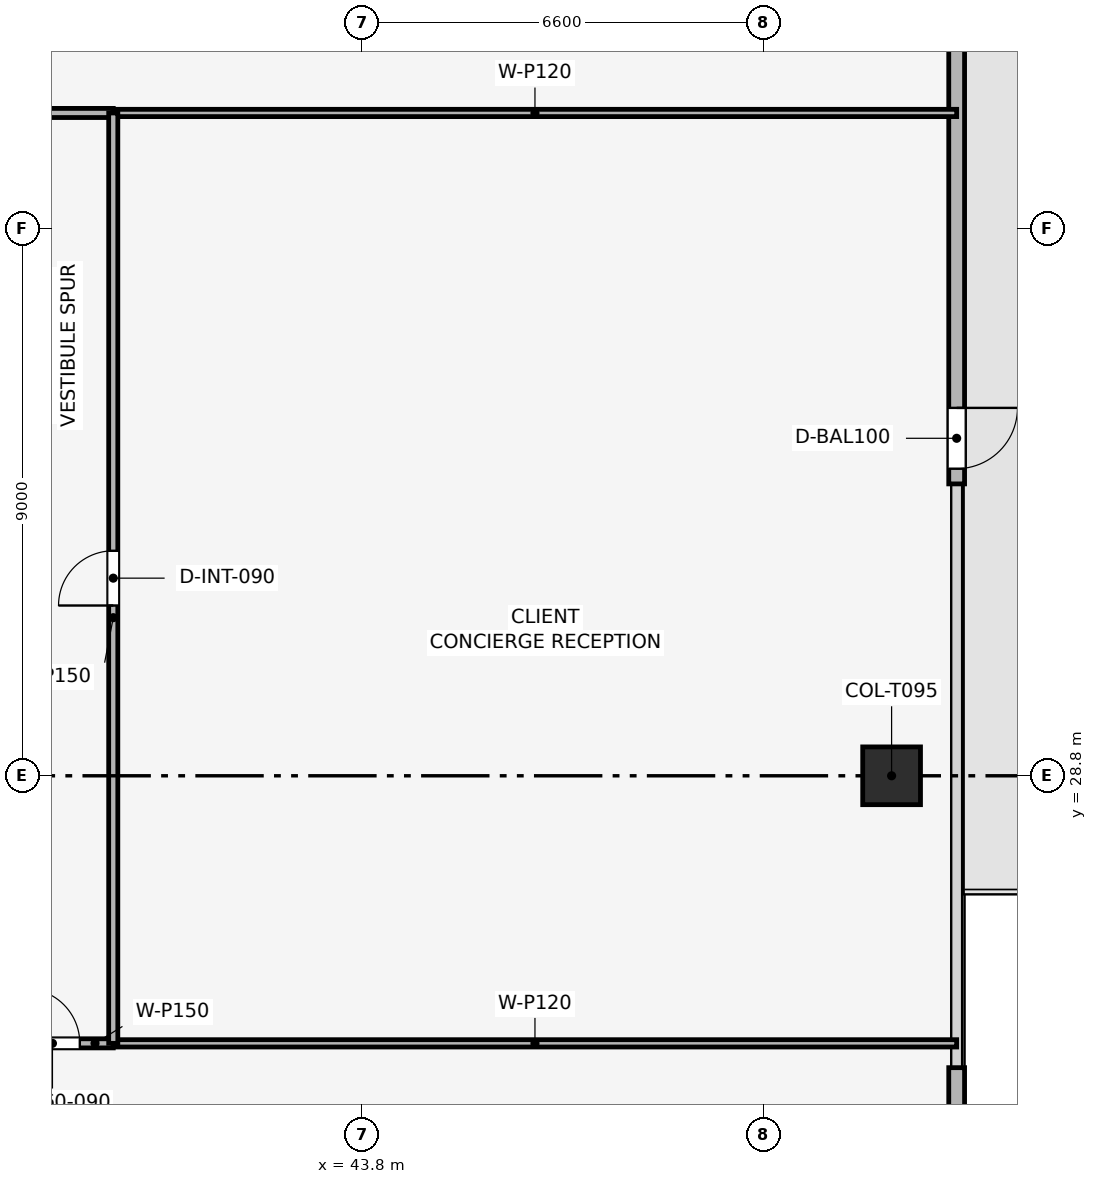
"""IFC4 building model, lengths in metres.
Left out: names, types, materials, properties, quantities, classifications, styles, units other than length and angle.
Written with IfcOpenShell. Run it as: python <this file> out.ifc"""

import sys

from ifc_helpers import new_model, si_unit, direction, frame, frame_2d, origin, origin_2d, place, context, subcontext, project, spatial, rectangle, extrude, element, fill, save


model = new_model("IFC4")
c1 = context("Model", 3, precision=1e-05, world=origin(), true_north=direction((0.0, 1.0)))
c2 = subcontext(c1, "Body", "Model", "MODEL_VIEW")
j1 = project(units=[si_unit("LENGTHUNIT", "METRE"), si_unit("PLANEANGLEUNIT", "RADIAN")], contexts=[c1])
p1 = place(None, origin())
s1 = spatial("IfcSite", under=j1, at=p1, CompositionType="ELEMENT")
p2 = place(p1, origin())
s2 = spatial("IfcBuilding", under=s1, at=p2, CompositionType="ELEMENT")
p3 = place(p2, frame((0.0, 0.0, 261.6)))
s3 = spatial("IfcBuildingStorey", under=s2, at=p3, CompositionType="ELEMENT", Elevation=261.6)
p4 = place(p3, frame((52.5, 28.8, 0.003), z_axis=(0.0, 0.0, 1.0), x_axis=(1.0, 0.0, 0.0)))
e1 = element("IfcColumn", 1, at=p4, inside=s3, PredefinedType="COLUMN", context=c2, shape_type="SweptSolid", body=[
    extrude(rectangle(XDim=0.95, YDim=0.95, at=origin_2d()), origin(), (0.0, 0.0, 1.0), 3.494),
])
p5 = place(p3, frame((53.57, 46.8, 0.0), z_axis=(0.0, 0.0, 1.0), x_axis=(0.0, -1.0, 0.0)))
e2 = element("IfcWall", 2, at=p5, inside=s3, PredefinedType="SOLIDWALL", context=c2, shape_type="SweptSolid", body=[
    extrude(rectangle(XDim=13.2, YDim=0.26, at=frame_2d((6.6, 0.0))), origin(), (0.0, 0.0, 1.0), 3.5),
])
p6 = place(p5, frame((11.95, 0.0, 0.0)))
e3 = element("IfcOpeningElement", 3, at=p6, cuts=e2, PredefinedType="OPENING", context=c2, shape_type="SweptSolid", body=[
    extrude(rectangle(XDim=1.0, YDim=2.2, at=frame_2d((0.5, 1.1))), frame((0.0, 0.14, 0.0), z_axis=(0.0, -1.0, 0.0), x_axis=(1.0, 0.0, 0.0)), (0.0, 0.0, 1.0), 0.28),
])
p7 = place(p3, frame((53.57, 24.0, 0.0), z_axis=(0.0, 0.0, 1.0), x_axis=(0.0, -1.0, 0.0)))
e4 = element("IfcWall", 4, at=p7, inside=s3, PredefinedType="SOLIDWALL", context=c2, shape_type="SweptSolid", body=[
    extrude(rectangle(XDim=13.2, YDim=0.26, at=frame_2d((6.6, 0.0))), origin(), (0.0, 0.0, 1.0), 3.5),
])
p8 = place(p7, frame((11.75, 0.0, 0.9)))
e5 = element("IfcOpeningElement", 5, at=p8, cuts=e4, PredefinedType="OPENING", context=c2, shape_type="SweptSolid", body=[
    extrude(rectangle(XDim=1.2, YDim=2.1, at=frame_2d((0.6, 1.05))), frame((0.0, 0.14, 0.0), z_axis=(0.0, -1.0, 0.0), x_axis=(1.0, 0.0, 0.0)), (0.0, 0.0, 1.0), 0.28),
])
p9 = place(p3, frame((37.8, 24.4, 0.0), z_axis=(0.0, 0.0, 1.0), x_axis=(1.0, 0.0, 0.0)))
e6 = element("IfcWall", 6, at=p9, inside=s3, PredefinedType="PARTITIONING", context=c2, shape_type="SweptSolid", body=[
    extrude(rectangle(XDim=1.9, YDim=0.15, at=frame_2d((0.95, 0.0))), origin(), (0.0, 0.0, 1.0), 3.5),
])
p10 = place(p9, frame((0.45, 0.0, 0.0)))
e7 = element("IfcOpeningElement", 7, at=p10, cuts=e6, PredefinedType="OPENING", context=c2, shape_type="SweptSolid", body=[
    extrude(rectangle(XDim=0.9, YDim=2.1, at=frame_2d((0.45, 1.05))), frame((0.0, 0.085, 0.0), z_axis=(0.0, -1.0, 0.0), x_axis=(1.0, 0.0, 0.0)), (0.0, 0.0, 1.0), 0.17),
])
for number, where, z_axis, x_axis in (
    (8, (39.7, 24.4, 0.0), (0.0, 0.0, 1.0), (1.0, 0.0, 0.0)),
    (9, (39.7, 39.7, 0.0), (0.0, 0.0, 1.0), (1.0, 0.0, 0.0)),
):
    element("IfcWall", number, at=place(p3, frame(where, z_axis=z_axis, x_axis=x_axis)), inside=s3, PredefinedType="PARTITIONING", context=c2, shape_type="SweptSolid", body=[
        extrude(rectangle(XDim=13.87, YDim=0.12, at=frame_2d((6.935, 0.0))), origin(), (0.0, 0.0, 1.0), 3.085),
    ])
p11 = place(p3, frame((17.9, 39.7, 0.0), z_axis=(0.0, 0.0, 1.0), x_axis=(1.0, 0.0, 0.0)))
e10 = element("IfcWall", 10, at=p11, inside=s3, PredefinedType="PARTITIONING", context=c2, shape_type="SweptSolid", body=[
    extrude(rectangle(XDim=21.8, YDim=0.15, at=frame_2d((10.9, 0.0))), origin(), (0.0, 0.0, 1.0), 3.085),
])
p12 = place(p11, frame((10.45, 0.0, 0.0)))
e11 = element("IfcOpeningElement", 11, at=p12, cuts=e10, PredefinedType="OPENING", context=c2, shape_type="SweptSolid", body=[
    extrude(rectangle(XDim=0.9, YDim=2.1, at=frame_2d((0.45, 1.05))), frame((0.0, 0.085, 0.0), z_axis=(0.0, -1.0, 0.0), x_axis=(1.0, 0.0, 0.0)), (0.0, 0.0, 1.0), 0.17),
])
p13 = place(p3, frame((39.7, 24.4, 0.0), z_axis=(0.0, 0.0, 1.0), x_axis=(0.0, 1.0, 0.0)))
e12 = element("IfcWall", 12, at=p13, inside=s3, PredefinedType="PARTITIONING", context=c2, shape_type="SweptSolid", body=[
    extrude(rectangle(XDim=15.3, YDim=0.15, at=frame_2d((7.65, 0.0))), origin(), (0.0, 0.0, 1.0), 3.085),
])
p14 = place(p13, frame((7.2, 0.0, 0.0)))
e13 = element("IfcOpeningElement", 13, at=p14, cuts=e12, PredefinedType="OPENING", context=c2, shape_type="SweptSolid", body=[
    extrude(rectangle(XDim=0.9, YDim=2.1, at=frame_2d((0.45, 1.05))), frame((0.0, 0.085, 0.0), z_axis=(0.0, -1.0, 0.0), x_axis=(1.0, 0.0, 0.0)), (0.0, 0.0, 1.0), 0.17),
])
p15 = place(p6, origin())
e14 = element("IfcDoor", 14, at=p15, inside=s3, OperationType="SINGLE_SWING_LEFT", PredefinedType="DOOR", context=c2, shape_type="SweptSolid", body=[
    extrude(rectangle(XDim=1.0, YDim=2.2, at=frame_2d((0.5, 1.1))), frame((0.0, 0.025, 0.0), z_axis=(0.0, -1.0, 0.0), x_axis=(1.0, 0.0, 0.0)), (0.0, 0.0, 1.0), 0.05),
])
fill(e3, e14)
p16 = place(p10, origin())
e15 = element("IfcDoor", 15, at=p16, inside=s3, OperationType="SINGLE_SWING_LEFT", PredefinedType="DOOR", context=c2, shape_type="SweptSolid", body=[
    extrude(rectangle(XDim=0.9, YDim=2.1, at=frame_2d((0.45, 1.05))), frame((0.0, 0.025, 0.0), z_axis=(0.0, -1.0, 0.0), x_axis=(1.0, 0.0, 0.0)), (0.0, 0.0, 1.0), 0.05),
])
fill(e7, e15)
p17 = place(p14, origin())
e16 = element("IfcDoor", 16, at=p17, inside=s3, OperationType="SINGLE_SWING_LEFT", PredefinedType="DOOR", context=c2, shape_type="SweptSolid", body=[
    extrude(rectangle(XDim=0.9, YDim=2.1, at=frame_2d((0.45, 1.05))), frame((0.0, 0.025, 0.0), z_axis=(0.0, -1.0, 0.0), x_axis=(1.0, 0.0, 0.0)), (0.0, 0.0, 1.0), 0.05),
])
fill(e13, e16)
save(model, sys.argv[1])
